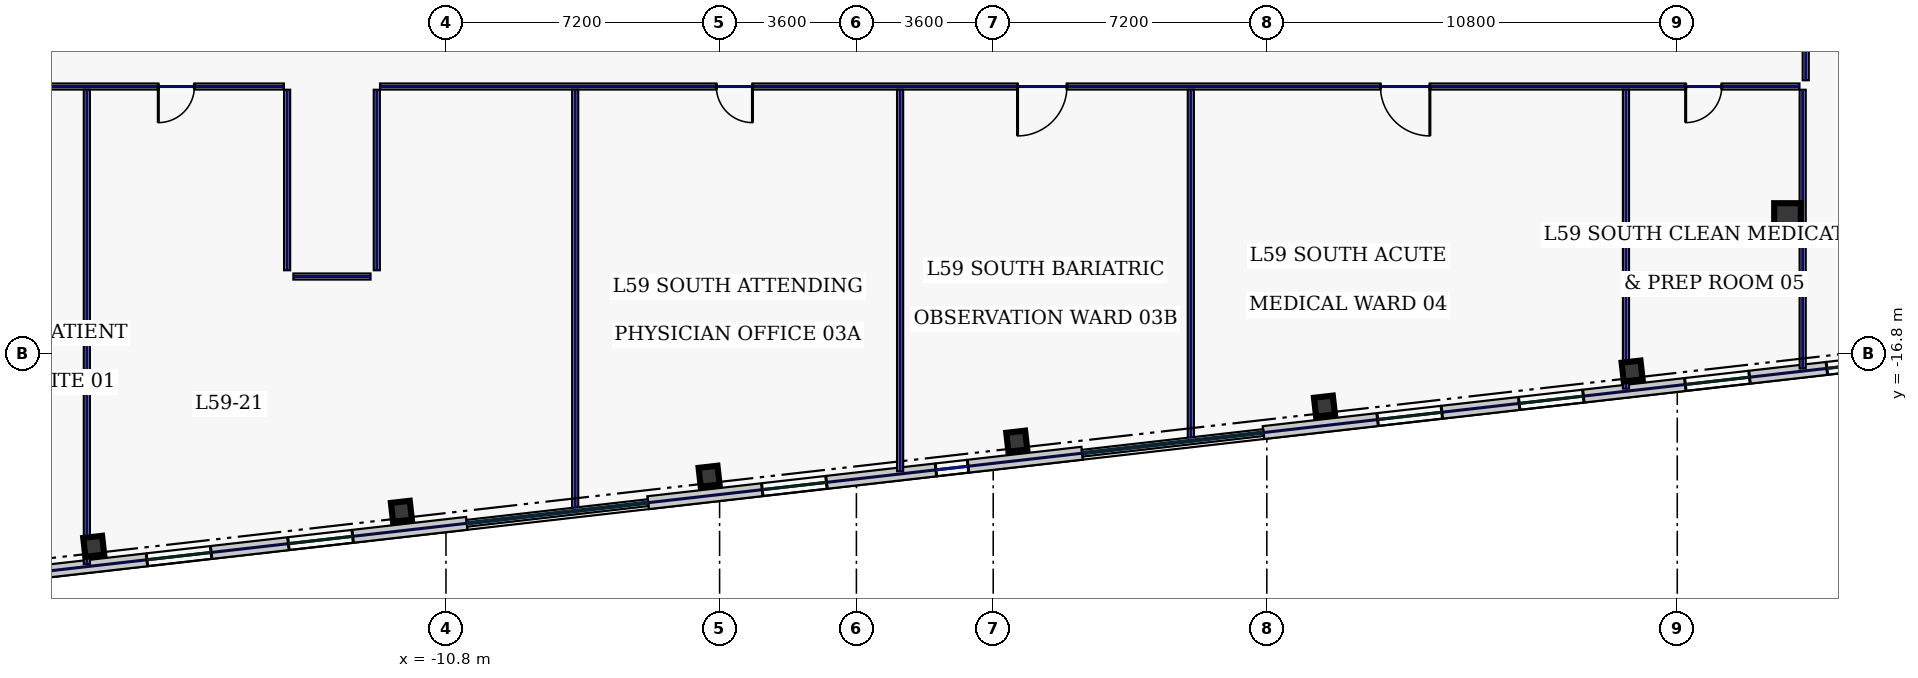
"""IFC4 building model, lengths in metres.
Left out: names, types, materials, properties, quantities, classifications, styles, units other than length and angle.
Written with IfcOpenShell. Run it as: python <this file> out.ifc"""

import sys

from ifc_helpers import new_model, si_unit, direction, frame, frame_2d, origin, origin_2d, place, context, subcontext, project, spatial, rectangle, hollow_rectangle, extrude, element, fill, save


model = new_model("IFC4")
c1 = context("Model", 3, precision=1e-05, world=origin(), true_north=direction((0.0, 1.0)))
c2 = subcontext(c1, "Body", "Model", "MODEL_VIEW")
j1 = project(units=[si_unit("LENGTHUNIT", "METRE"), si_unit("PLANEANGLEUNIT", "RADIAN")], contexts=[c1])
p1 = place(None, origin())
s1 = spatial("IfcSite", under=j1, at=p1, CompositionType="ELEMENT")
p2 = place(p1, origin())
s2 = spatial("IfcBuilding", under=s1, at=p2, CompositionType="ELEMENT")
p3 = place(p2, frame((0.0, 0.0, 255.0)))
s3 = spatial("IfcBuildingStorey", under=s2, at=p3, CompositionType="ELEMENT", Elevation=255.0)
p4 = place(p3, frame((24.5, -13.2, 0.0), z_axis=(0.0, 0.0, 1.0), x_axis=(1.0, 0.0, 0.0)))
e1 = element("IfcColumn", 1, at=p4, inside=s3, PredefinedType="COLUMN", context=c2, shape_type="SweptSolid", body=[
    extrude(hollow_rectangle(XDim=0.7, YDim=0.7, WallThickness=0.032, at=origin_2d()), origin(), (0.0, 0.0, 1.0), 3.74),
])
for number, where, z_axis, x_axis in (
    (2, (-20.069, -21.88, 0.0), (0.0, 0.0, 1.0), (0.994, 0.113, 0.0)),
    (3, (-11.972, -20.958, 0.0), (0.0, 0.0, 1.0), (0.994, 0.113, 0.0)),
    (4, (-3.876, -20.035, 0.0), (0.0, 0.0, 1.0), (0.994, 0.113, 0.0)),
    (5, (4.22, -19.113, 0.0), (0.0, 0.0, 1.0), (0.994, 0.113, 0.0)),
    (6, (12.316, -18.19, 0.0), (0.0, 0.0, 1.0), (0.994, 0.113, 0.0)),
    (7, (20.412, -17.268, 0.0), (0.0, 0.0, 1.0), (0.994, 0.113, 0.0)),
):
    element("IfcColumn", number, at=place(p3, frame(where, z_axis=z_axis, x_axis=x_axis)), inside=s3, PredefinedType="COLUMN", context=c2, shape_type="SweptSolid", body=[
        extrude(hollow_rectangle(XDim=0.5, YDim=0.5, WallThickness=0.025, at=origin_2d()), origin(), (0.0, 0.0, 1.0), 3.74),
    ])
p5 = place(p3, frame((-28.783, -23.386, 0.0), z_axis=(0.0, 0.0, 1.0), x_axis=(0.993572271362, 0.113199565282, 0.0)))
e8 = element("IfcWall", 8, at=p5, inside=s3, PredefinedType="STANDARD", context=c2, shape_type="SweptSolid", body=[
    extrude(rectangle(XDim=18.651, YDim=0.34, at=frame_2d((9.326, 0.0))), origin(), (0.0, 0.0, 1.0), 3.74),
])
p6 = place(p5, frame((2.03, 0.0, 0.88)))
e9 = element("IfcOpeningElement", 9, at=p6, cuts=e8, PredefinedType="OPENING", context=c2, shape_type="SweptSolid", body=[
    extrude(rectangle(XDim=0.85, YDim=1.85, at=frame_2d((0.425, 0.925))), frame((0.0, 0.18, 0.0), z_axis=(0.0, -1.0, 0.0), x_axis=(1.0, 0.0, 0.0)), (0.0, 0.0, 1.0), 0.36),
])
p7 = place(p5, frame((5.779, 0.0, 0.88)))
e10 = element("IfcOpeningElement", 10, at=p7, cuts=e8, PredefinedType="OPENING", context=c2, shape_type="SweptSolid", body=[
    extrude(rectangle(XDim=1.7, YDim=1.95, at=frame_2d((0.85, 0.975))), frame((0.0, 0.18, 0.0), z_axis=(0.0, -1.0, 0.0), x_axis=(1.0, 0.0, 0.0)), (0.0, 0.0, 1.0), 0.36),
])
p8 = place(p5, frame((10.179, 0.0, 0.88)))
e11 = element("IfcOpeningElement", 11, at=p8, cuts=e8, PredefinedType="OPENING", context=c2, shape_type="SweptSolid", body=[
    extrude(rectangle(XDim=1.7, YDim=1.95, at=frame_2d((0.85, 0.975))), frame((0.0, 0.18, 0.0), z_axis=(0.0, -1.0, 0.0), x_axis=(1.0, 0.0, 0.0)), (0.0, 0.0, 1.0), 0.36),
])
p9 = place(p5, frame((13.927, 0.0, 0.88)))
e12 = element("IfcOpeningElement", 12, at=p9, cuts=e8, PredefinedType="OPENING", context=c2, shape_type="SweptSolid", body=[
    extrude(rectangle(XDim=1.7, YDim=1.95, at=frame_2d((0.85, 0.975))), frame((0.0, 0.18, 0.0), z_axis=(0.0, -1.0, 0.0), x_axis=(1.0, 0.0, 0.0)), (0.0, 0.0, 1.0), 0.36),
])
p10 = place(p3, frame((-5.482, -20.731, 0.0), z_axis=(0.0, 0.0, 1.0), x_axis=(0.993571968199, 0.113202226169, 0.0)))
e13 = element("IfcWall", 13, at=p10, inside=s3, PredefinedType="STANDARD", context=c2, shape_type="SweptSolid", body=[
    extrude(rectangle(XDim=11.497, YDim=0.34, at=frame_2d((5.749, 0.0))), origin(), (0.0, 0.0, 1.0), 3.74),
])
p11 = place(p10, frame((3.024, 0.0, 0.88)))
e14 = element("IfcOpeningElement", 14, at=p11, cuts=e13, PredefinedType="OPENING", context=c2, shape_type="SweptSolid", body=[
    extrude(rectangle(XDim=1.7, YDim=1.95, at=frame_2d((0.85, 0.975))), frame((0.0, 0.18, 0.0), z_axis=(0.0, -1.0, 0.0), x_axis=(1.0, 0.0, 0.0)), (0.0, 0.0, 1.0), 0.36),
])
p12 = place(p10, frame((7.623, 0.0, 0.88)))
e15 = element("IfcOpeningElement", 15, at=p12, cuts=e13, PredefinedType="OPENING", context=c2, shape_type="SweptSolid", body=[
    extrude(rectangle(XDim=0.85, YDim=1.85, at=frame_2d((0.425, 0.925))), frame((0.0, 0.18, 0.0), z_axis=(0.0, -1.0, 0.0), x_axis=(1.0, 0.0, 0.0)), (0.0, 0.0, 1.0), 0.36),
])
p13 = place(p3, frame((10.71, -18.886, 0.0), z_axis=(0.0, 0.0, 1.0), x_axis=(0.993572271362, 0.113199565282, 0.0)))
e16 = element("IfcWall", 16, at=p13, inside=s3, PredefinedType="STANDARD", context=c2, shape_type="SweptSolid", body=[
    extrude(rectangle(XDim=18.651, YDim=0.34, at=frame_2d((9.326, 0.0))), origin(), (0.0, 0.0, 1.0), 3.74),
])
p14 = place(p13, frame((3.024, 0.0, 0.88)))
e17 = element("IfcOpeningElement", 17, at=p14, cuts=e16, PredefinedType="OPENING", context=c2, shape_type="SweptSolid", body=[
    extrude(rectangle(XDim=1.7, YDim=1.95, at=frame_2d((0.85, 0.975))), frame((0.0, 0.18, 0.0), z_axis=(0.0, -1.0, 0.0), x_axis=(1.0, 0.0, 0.0)), (0.0, 0.0, 1.0), 0.36),
])
p15 = place(p13, frame((6.773, 0.0, 0.88)))
e18 = element("IfcOpeningElement", 18, at=p15, cuts=e16, PredefinedType="OPENING", context=c2, shape_type="SweptSolid", body=[
    extrude(rectangle(XDim=1.7, YDim=1.95, at=frame_2d((0.85, 0.975))), frame((0.0, 0.18, 0.0), z_axis=(0.0, -1.0, 0.0), x_axis=(1.0, 0.0, 0.0)), (0.0, 0.0, 1.0), 0.36),
])
p16 = place(p13, frame((11.173, 0.0, 0.88)))
e19 = element("IfcOpeningElement", 19, at=p16, cuts=e16, PredefinedType="OPENING", context=c2, shape_type="SweptSolid", body=[
    extrude(rectangle(XDim=1.7, YDim=1.95, at=frame_2d((0.85, 0.975))), frame((0.0, 0.18, 0.0), z_axis=(0.0, -1.0, 0.0), x_axis=(1.0, 0.0, 0.0)), (0.0, 0.0, 1.0), 0.36),
])
p17 = place(p13, frame((14.921, 0.0, 0.88)))
e20 = element("IfcOpeningElement", 20, at=p17, cuts=e16, PredefinedType="OPENING", context=c2, shape_type="SweptSolid", body=[
    extrude(rectangle(XDim=1.7, YDim=1.95, at=frame_2d((0.85, 0.975))), frame((0.0, 0.18, 0.0), z_axis=(0.0, -1.0, 0.0), x_axis=(1.0, 0.0, 0.0)), (0.0, 0.0, 1.0), 0.36),
])
p18 = place(p3, frame((24.98, 9.665, 0.0), z_axis=(0.0, 0.0, 1.0), x_axis=(0.0, -1.0, 0.0)))
e21 = element("IfcWall", 21, at=p18, inside=s3, PredefinedType="PARTITIONING", context=c2, shape_type="SweptSolid", body=[
    extrude(rectangle(XDim=19.28, YDim=0.16, at=frame_2d((9.64, 0.0))), origin(), (0.0, 0.0, 1.0), 3.74),
])
p19 = place(p18, frame((16.531, 0.0, 0.0)))
e22 = element("IfcOpeningElement", 22, at=p19, cuts=e21, PredefinedType="OPENING", context=c2, shape_type="SweptSolid", body=[
    extrude(rectangle(XDim=0.95, YDim=2.2, at=frame_2d((0.475, 1.1))), frame((0.0, 0.09, 0.0), z_axis=(0.0, -1.0, 0.0), x_axis=(1.0, 0.0, 0.0)), (0.0, 0.0, 1.0), 0.18),
])
p20 = place(p18, frame((11.25, 0.0, 0.0)))
e23 = element("IfcOpeningElement", 23, at=p20, cuts=e21, PredefinedType="OPENING", context=c2, shape_type="SweptSolid", body=[
    extrude(rectangle(XDim=0.95, YDim=2.2, at=frame_2d((0.475, 1.1))), frame((0.0, 0.09, 0.0), z_axis=(0.0, -1.0, 0.0), x_axis=(1.0, 0.0, 0.0)), (0.0, 0.0, 1.0), 0.18),
])
p21 = place(p18, frame((6.05, 0.0, 0.0)))
e24 = element("IfcOpeningElement", 24, at=p21, cuts=e21, PredefinedType="OPENING", context=c2, shape_type="SweptSolid", body=[
    extrude(rectangle(XDim=0.95, YDim=2.2, at=frame_2d((0.475, 1.1))), frame((0.0, 0.09, 0.0), z_axis=(0.0, -1.0, 0.0), x_axis=(1.0, 0.0, 0.0)), (0.0, 0.0, 1.0), 0.18),
])
p22 = place(p18, frame((1.994, 0.0, 0.0)))
e25 = element("IfcOpeningElement", 25, at=p22, cuts=e21, PredefinedType="OPENING", context=c2, shape_type="SweptSolid", body=[
    extrude(rectangle(XDim=0.95, YDim=2.2, at=frame_2d((0.475, 1.1))), frame((0.0, 0.09, 0.0), z_axis=(0.0, -1.0, 0.0), x_axis=(1.0, 0.0, 0.0)), (0.0, 0.0, 1.0), 0.18),
])
p23 = place(p3, frame((24.815, -9.78, 0.0), z_axis=(0.0, 0.0, 1.0), x_axis=(-1.0, 0.0, 0.0)))
e26 = element("IfcWall", 26, at=p23, inside=s3, PredefinedType="PARTITIONING", context=c2, shape_type="SweptSolid", body=[
    extrude(rectangle(XDim=37.35, YDim=0.16, at=frame_2d((18.675, 0.0))), origin(), (0.0, 0.0, 1.0), 3.74),
])
p24 = place(p23, frame((27.55, 0.0, 0.0)))
e27 = element("IfcOpeningElement", 27, at=p24, cuts=e26, PredefinedType="OPENING", context=c2, shape_type="SweptSolid", body=[
    extrude(rectangle(XDim=0.95, YDim=2.2, at=frame_2d((0.475, 1.1))), frame((0.0, 0.09, 0.0), z_axis=(0.0, -1.0, 0.0), x_axis=(1.0, 0.0, 0.0)), (0.0, 0.0, 1.0), 0.18),
])
p25 = place(p23, frame((19.275, 0.0, 0.0)))
e28 = element("IfcOpeningElement", 28, at=p25, cuts=e26, PredefinedType="OPENING", context=c2, shape_type="SweptSolid", body=[
    extrude(rectangle(XDim=1.3, YDim=2.2, at=frame_2d((0.65, 1.1))), frame((0.0, 0.09, 0.0), z_axis=(0.0, -1.0, 0.0), x_axis=(1.0, 0.0, 0.0)), (0.0, 0.0, 1.0), 0.18),
])
p26 = place(p23, frame((9.725, 0.0, 0.0)))
e29 = element("IfcOpeningElement", 29, at=p26, cuts=e26, PredefinedType="OPENING", context=c2, shape_type="SweptSolid", body=[
    extrude(rectangle(XDim=1.3, YDim=2.2, at=frame_2d((0.65, 1.1))), frame((0.0, 0.09, 0.0), z_axis=(0.0, -1.0, 0.0), x_axis=(1.0, 0.0, 0.0)), (0.0, 0.0, 1.0), 0.18),
])
p27 = place(p23, frame((2.044, 0.0, 0.0)))
e30 = element("IfcOpeningElement", 30, at=p27, cuts=e26, PredefinedType="OPENING", context=c2, shape_type="SweptSolid", body=[
    extrude(rectangle(XDim=0.95, YDim=2.2, at=frame_2d((0.475, 1.1))), frame((0.0, 0.09, 0.0), z_axis=(0.0, -1.0, 0.0), x_axis=(1.0, 0.0, 0.0)), (0.0, 0.0, 1.0), 0.18),
])
p28 = place(p3, frame((-12.62, -9.865, 0.0), z_axis=(0.0, 0.0, 1.0), x_axis=(0.0, -1.0, 0.0)))
e31 = element("IfcWall", 31, at=p28, inside=s3, PredefinedType="PARTITIONING", context=c2, shape_type="SweptSolid", body=[
    extrude(rectangle(XDim=4.75, YDim=0.16, at=frame_2d((2.375, 0.0))), origin(), (0.0, 0.0, 1.0), 3.74),
])
p29 = place(p3, frame((-12.785, -14.78, 0.0), z_axis=(0.0, 0.0, 1.0), x_axis=(-1.0, 0.0, 0.0)))
e32 = element("IfcWall", 32, at=p29, inside=s3, PredefinedType="PARTITIONING", context=c2, shape_type="SweptSolid", body=[
    extrude(rectangle(XDim=2.03, YDim=0.16, at=frame_2d((1.015, 0.0))), origin(), (0.0, 0.0, 1.0), 3.74),
])
p30 = place(p3, frame((-14.98, -14.615, 0.0), z_axis=(0.0, 0.0, 1.0), x_axis=(0.0, 1.0, 0.0)))
e33 = element("IfcWall", 33, at=p30, inside=s3, PredefinedType="PARTITIONING", context=c2, shape_type="SweptSolid", body=[
    extrude(rectangle(XDim=4.75, YDim=0.16, at=frame_2d((2.375, 0.0))), origin(), (0.0, 0.0, 1.0), 3.74),
])
p31 = place(p3, frame((-15.065, -9.78, 0.0), z_axis=(0.0, 0.0, 1.0), x_axis=(-1.0, 0.0, 0.0)))
e34 = element("IfcWall", 34, at=p31, inside=s3, PredefinedType="PARTITIONING", context=c2, shape_type="SweptSolid", body=[
    extrude(rectangle(XDim=9.75, YDim=0.16, at=frame_2d((4.875, 0.0))), origin(), (0.0, 0.0, 1.0), 3.74),
])
p32 = place(p31, frame((6.926, 0.0, 0.0)))
e35 = element("IfcOpeningElement", 35, at=p32, cuts=e34, PredefinedType="OPENING", context=c2, shape_type="SweptSolid", body=[
    extrude(rectangle(XDim=0.95, YDim=2.2, at=frame_2d((0.475, 1.1))), frame((0.0, 0.09, 0.0), z_axis=(0.0, -1.0, 0.0), x_axis=(1.0, 0.0, 0.0)), (0.0, 0.0, 1.0), 0.18),
])
p33 = place(p31, frame((2.354, 0.0, 0.0)))
e36 = element("IfcOpeningElement", 36, at=p33, cuts=e34, PredefinedType="OPENING", context=c2, shape_type="SweptSolid", body=[
    extrude(rectangle(XDim=0.95, YDim=2.2, at=frame_2d((0.475, 1.1))), frame((0.0, 0.09, 0.0), z_axis=(0.0, -1.0, 0.0), x_axis=(1.0, 0.0, 0.0)), (0.0, 0.0, 1.0), 0.18),
])
p34 = place(p3, frame((24.9, -17.199, 0.0), z_axis=(0.0, 0.0, 1.0), x_axis=(0.0, 1.0, 0.0)))
e37 = element("IfcWall", 37, at=p34, inside=s3, PredefinedType="PARTITIONING", context=c2, shape_type="SweptSolid", body=[
    extrude(rectangle(XDim=7.334, YDim=0.16, at=frame_2d((3.667, 0.0))), origin(), (0.0, 0.0, 1.0), 3.74),
])
p35 = place(p3, frame((-20.25, -22.344, 0.0), z_axis=(0.0, 0.0, 1.0), x_axis=(0.0, 1.0, 0.0)))
e38 = element("IfcWall", 38, at=p35, inside=s3, PredefinedType="PARTITIONING", context=c2, shape_type="SweptSolid", body=[
    extrude(rectangle(XDim=12.479, YDim=0.16, at=frame_2d((6.239, 0.0))), origin(), (0.0, 0.0, 1.0), 3.74),
])
p36 = place(p3, frame((-7.4, -20.879, 0.0), z_axis=(0.0, 0.0, 1.0), x_axis=(0.0, 1.0, 0.0)))
e39 = element("IfcWall", 39, at=p36, inside=s3, PredefinedType="PARTITIONING", context=c2, shape_type="SweptSolid", body=[
    extrude(rectangle(XDim=11.014, YDim=0.16, at=frame_2d((5.507, 0.0))), origin(), (0.0, 0.0, 1.0), 3.74),
])
p37 = place(p3, frame((8.8, -19.034, 0.0), z_axis=(0.0, 0.0, 1.0), x_axis=(0.0, 1.0, 0.0)))
e40 = element("IfcWall", 40, at=p37, inside=s3, PredefinedType="PARTITIONING", context=c2, shape_type="SweptSolid", body=[
    extrude(rectangle(XDim=9.169, YDim=0.16, at=frame_2d((4.584, 0.0))), origin(), (0.0, 0.0, 1.0), 3.74),
])
p38 = place(p3, frame((20.25, -17.729, 0.0), z_axis=(0.0, 0.0, 1.0), x_axis=(0.0, 1.0, 0.0)))
e41 = element("IfcWall", 41, at=p38, inside=s3, PredefinedType="PARTITIONING", context=c2, shape_type="SweptSolid", body=[
    extrude(rectangle(XDim=7.864, YDim=0.16, at=frame_2d((3.932, 0.0))), origin(), (0.0, 0.0, 1.0), 3.74),
])
p39 = place(p3, frame((1.15, -19.906, 0.0), z_axis=(0.0, 0.0, 1.0), x_axis=(0.0, 1.0, 0.0)))
e42 = element("IfcWall", 42, at=p39, inside=s3, PredefinedType="PARTITIONING", context=c2, shape_type="SweptSolid", body=[
    extrude(rectangle(XDim=10.041, YDim=0.16, at=frame_2d((5.02, 0.0))), origin(), (0.0, 0.0, 1.0), 3.74),
])
p40 = place(p8, origin())
e43 = element("IfcWindow", 43, at=p40, inside=s3, PartitioningType="SINGLE_PANEL", PredefinedType="WINDOW", context=c2, shape_type="SweptSolid", body=[
    extrude(rectangle(XDim=1.7, YDim=1.95, at=frame_2d((0.85, 0.975))), frame((0.0, 0.03, 0.0), z_axis=(0.0, -1.0, 0.0), x_axis=(1.0, 0.0, 0.0)), (0.0, 0.0, 1.0), 0.06),
])
fill(e11, e43)
p41 = place(p9, origin())
e44 = element("IfcWindow", 44, at=p41, inside=s3, PartitioningType="SINGLE_PANEL", PredefinedType="WINDOW", context=c2, shape_type="SweptSolid", body=[
    extrude(rectangle(XDim=1.7, YDim=1.95, at=frame_2d((0.85, 0.975))), frame((0.0, 0.03, 0.0), z_axis=(0.0, -1.0, 0.0), x_axis=(1.0, 0.0, 0.0)), (0.0, 0.0, 1.0), 0.06),
])
fill(e12, e44)
p42 = place(p11, origin())
e45 = element("IfcWindow", 45, at=p42, inside=s3, PartitioningType="SINGLE_PANEL", PredefinedType="WINDOW", context=c2, shape_type="SweptSolid", body=[
    extrude(rectangle(XDim=1.7, YDim=1.95, at=frame_2d((0.85, 0.975))), frame((0.0, 0.03, 0.0), z_axis=(0.0, -1.0, 0.0), x_axis=(1.0, 0.0, 0.0)), (0.0, 0.0, 1.0), 0.06),
])
fill(e14, e45)
p43 = place(p12, origin())
e46 = element("IfcWindow", 46, at=p43, inside=s3, PartitioningType="SINGLE_PANEL", PredefinedType="WINDOW", context=c2, shape_type="SweptSolid", body=[
    extrude(rectangle(XDim=0.85, YDim=1.85, at=frame_2d((0.425, 0.925))), frame((0.0, 0.03, 0.0), z_axis=(0.0, -1.0, 0.0), x_axis=(1.0, 0.0, 0.0)), (0.0, 0.0, 1.0), 0.06),
])
fill(e15, e46)
p44 = place(p14, origin())
e47 = element("IfcWindow", 47, at=p44, inside=s3, PartitioningType="SINGLE_PANEL", PredefinedType="WINDOW", context=c2, shape_type="SweptSolid", body=[
    extrude(rectangle(XDim=1.7, YDim=1.95, at=frame_2d((0.85, 0.975))), frame((0.0, 0.03, 0.0), z_axis=(0.0, -1.0, 0.0), x_axis=(1.0, 0.0, 0.0)), (0.0, 0.0, 1.0), 0.06),
])
fill(e17, e47)
p45 = place(p15, origin())
e48 = element("IfcWindow", 48, at=p45, inside=s3, PartitioningType="SINGLE_PANEL", PredefinedType="WINDOW", context=c2, shape_type="SweptSolid", body=[
    extrude(rectangle(XDim=1.7, YDim=1.95, at=frame_2d((0.85, 0.975))), frame((0.0, 0.03, 0.0), z_axis=(0.0, -1.0, 0.0), x_axis=(1.0, 0.0, 0.0)), (0.0, 0.0, 1.0), 0.06),
])
fill(e18, e48)
p46 = place(p16, origin())
e49 = element("IfcWindow", 49, at=p46, inside=s3, PartitioningType="SINGLE_PANEL", PredefinedType="WINDOW", context=c2, shape_type="SweptSolid", body=[
    extrude(rectangle(XDim=1.7, YDim=1.95, at=frame_2d((0.85, 0.975))), frame((0.0, 0.03, 0.0), z_axis=(0.0, -1.0, 0.0), x_axis=(1.0, 0.0, 0.0)), (0.0, 0.0, 1.0), 0.06),
])
fill(e19, e49)
p47 = place(p17, origin())
e50 = element("IfcWindow", 50, at=p47, inside=s3, PartitioningType="SINGLE_PANEL", PredefinedType="WINDOW", context=c2, shape_type="SweptSolid", body=[
    extrude(rectangle(XDim=1.7, YDim=1.95, at=frame_2d((0.85, 0.975))), frame((0.0, 0.03, 0.0), z_axis=(0.0, -1.0, 0.0), x_axis=(1.0, 0.0, 0.0)), (0.0, 0.0, 1.0), 0.06),
])
fill(e20, e50)
p48 = place(p33, origin())
e51 = element("IfcDoor", 51, at=p48, inside=s3, OperationType="SINGLE_SWING_RIGHT", PredefinedType="DOOR", context=c2, shape_type="SweptSolid", body=[
    extrude(rectangle(XDim=0.95, YDim=2.2, at=frame_2d((0.475, 1.1))), frame((0.0, 0.025, 0.0), z_axis=(0.0, -1.0, 0.0), x_axis=(1.0, 0.0, 0.0)), (0.0, 0.0, 1.0), 0.05),
])
fill(e36, e51)
p49 = place(p24, origin())
e52 = element("IfcDoor", 52, at=p49, inside=s3, OperationType="SINGLE_SWING_LEFT", PredefinedType="DOOR", context=c2, shape_type="SweptSolid", body=[
    extrude(rectangle(XDim=0.95, YDim=2.2, at=frame_2d((0.475, 1.1))), frame((0.0, 0.025, 0.0), z_axis=(0.0, -1.0, 0.0), x_axis=(1.0, 0.0, 0.0)), (0.0, 0.0, 1.0), 0.05),
])
fill(e27, e52)
p50 = place(p25, origin())
e53 = element("IfcDoor", 53, at=p50, inside=s3, OperationType="SINGLE_SWING_RIGHT", PredefinedType="DOOR", context=c2, shape_type="SweptSolid", body=[
    extrude(rectangle(XDim=1.3, YDim=2.2, at=frame_2d((0.65, 1.1))), frame((0.0, 0.025, 0.0), z_axis=(0.0, -1.0, 0.0), x_axis=(1.0, 0.0, 0.0)), (0.0, 0.0, 1.0), 0.05),
])
fill(e28, e53)
p51 = place(p26, origin())
e54 = element("IfcDoor", 54, at=p51, inside=s3, OperationType="SINGLE_SWING_LEFT", PredefinedType="DOOR", context=c2, shape_type="SweptSolid", body=[
    extrude(rectangle(XDim=1.3, YDim=2.2, at=frame_2d((0.65, 1.1))), frame((0.0, 0.025, 0.0), z_axis=(0.0, -1.0, 0.0), x_axis=(1.0, 0.0, 0.0)), (0.0, 0.0, 1.0), 0.05),
])
fill(e29, e54)
p52 = place(p27, origin())
e55 = element("IfcDoor", 55, at=p52, inside=s3, OperationType="SINGLE_SWING_RIGHT", PredefinedType="DOOR", context=c2, shape_type="SweptSolid", body=[
    extrude(rectangle(XDim=0.95, YDim=2.2, at=frame_2d((0.475, 1.1))), frame((0.0, 0.025, 0.0), z_axis=(0.0, -1.0, 0.0), x_axis=(1.0, 0.0, 0.0)), (0.0, 0.0, 1.0), 0.05),
])
fill(e30, e55)
save(model, sys.argv[1])
